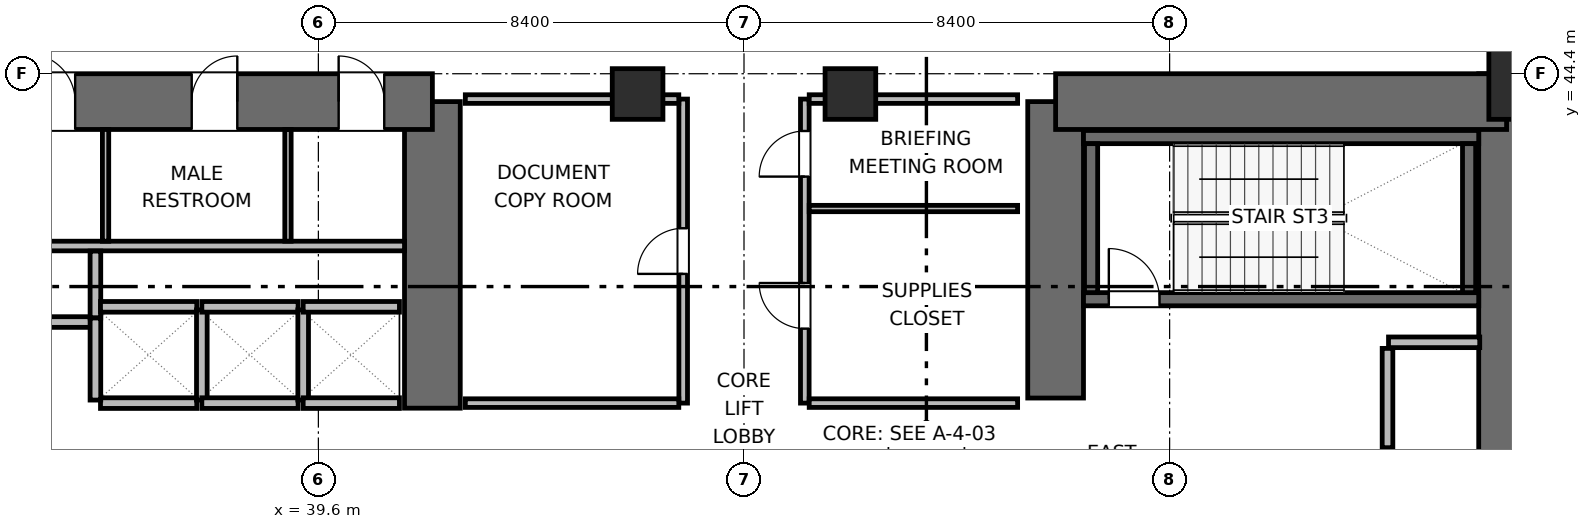
"""IFC4 building model, lengths in metres.
Left out: names, types, materials, properties, quantities, classifications, styles, units other than length and angle.
Written with IfcOpenShell. Run it as: python <this file> out.ifc"""

import sys

from ifc_helpers import new_model, si_unit, direction, frame, frame_2d, origin, origin_2d, place, context, subcontext, project, spatial, rectangle, extrude, element, fill, save


model = new_model("IFC4")
c1 = context("Model", 3, precision=1e-05, world=origin(), true_north=direction((0.0, 1.0)))
c2 = subcontext(c1, "Body", "Model", "MODEL_VIEW")
j1 = project(units=[si_unit("LENGTHUNIT", "METRE"), si_unit("PLANEANGLEUNIT", "RADIAN")], contexts=[c1])
p1 = place(None, origin())
s1 = spatial("IfcSite", under=j1, at=p1, CompositionType="ELEMENT")
p2 = place(p1, origin())
s2 = spatial("IfcBuilding", under=s1, at=p2, CompositionType="ELEMENT")
p3 = place(p2, frame((0.0, 0.0, 17.1)))
s3 = spatial("IfcBuildingStorey", under=s2, at=p3, CompositionType="ELEMENT", Elevation=17.1)
p4 = place(p3, frame((41.85, 37.8, 0.0), z_axis=(0.0, 0.0, 1.0), x_axis=(0.0, 1.0, 0.0)))
e1 = element("IfcWall", 1, at=p4, inside=s3, PredefinedType="SHEAR", context=c2, shape_type="SweptSolid", body=[
    extrude(rectangle(XDim=6.05, YDim=1.1, at=frame_2d((3.025, 0.0))), origin(), (0.0, 0.0, 1.0), 4.5),
])
p5 = place(p3, frame((32.95, 43.85, 0.0), z_axis=(0.0, 0.0, 1.0), x_axis=(1.0, 0.0, 0.0)))
e2 = element("IfcWall", 2, at=p5, inside=s3, PredefinedType="SHEAR", context=c2, shape_type="SweptSolid", body=[
    extrude(rectangle(XDim=8.9, YDim=1.1, at=frame_2d((4.45, 0.0))), origin(), (0.0, 0.0, 1.0), 4.5),
])
p6 = place(p5, frame((0.9, 0.0, 0.0)))
e3 = element("IfcOpeningElement", 3, at=p6, cuts=e2, PredefinedType="OPENING", context=c2, shape_type="SweptSolid", body=[
    extrude(rectangle(XDim=0.95, YDim=2.04, at=frame_2d((0.475, 1.02))), frame((0.0, 0.56, 0.0), z_axis=(0.0, -1.0, 0.0), x_axis=(1.0, 0.0, 0.0)), (0.0, 0.0, 1.0), 1.12),
])
p7 = place(p5, frame((4.15, 0.0, 0.0)))
e4 = element("IfcOpeningElement", 4, at=p7, cuts=e2, PredefinedType="OPENING", context=c2, shape_type="SweptSolid", body=[
    extrude(rectangle(XDim=0.9, YDim=2.02, at=frame_2d((0.45, 1.01))), frame((0.0, 0.56, 0.0), z_axis=(0.0, -1.0, 0.0), x_axis=(1.0, 0.0, 0.0)), (0.0, 0.0, 1.0), 1.12),
])
p8 = place(p5, frame((7.05, 0.0, 0.0)))
e5 = element("IfcOpeningElement", 5, at=p8, cuts=e2, PredefinedType="OPENING", context=c2, shape_type="SweptSolid", body=[
    extrude(rectangle(XDim=0.9, YDim=2.02, at=frame_2d((0.45, 1.01))), frame((0.0, 0.56, 0.0), z_axis=(0.0, -1.0, 0.0), x_axis=(1.0, 0.0, 0.0)), (0.0, 0.0, 1.0), 1.12),
])
p9 = place(p3, frame((54.15, 38.0, 0.0), z_axis=(0.0, 0.0, 1.0), x_axis=(0.0, 1.0, 0.0)))
e6 = element("IfcWall", 6, at=p9, inside=s3, PredefinedType="SHEAR", context=c2, shape_type="SweptSolid", body=[
    extrude(rectangle(XDim=5.85, YDim=1.1, at=frame_2d((2.925, 0.0))), origin(), (0.0, 0.0, 1.0), 4.5),
])
p10 = place(p3, frame((63.05, 27.6, 0.0), z_axis=(0.0, 0.0, 1.0), x_axis=(0.0, 1.0, 0.0)))
e7 = element("IfcWall", 7, at=p10, inside=s3, PredefinedType="SHEAR", context=c2, shape_type="SweptSolid", body=[
    extrude(rectangle(XDim=16.8, YDim=1.1, at=frame_2d((8.4, 0.0))), origin(), (0.0, 0.0, 1.0), 4.5),
])
p11 = place(p3, frame((54.15, 43.85, 0.0), z_axis=(0.0, 0.0, 1.0), x_axis=(1.0, 0.0, 0.0)))
e8 = element("IfcWall", 8, at=p11, inside=s3, PredefinedType="SHEAR", context=c2, shape_type="SweptSolid", body=[
    extrude(rectangle(XDim=8.9, YDim=1.1, at=frame_2d((4.45, 0.0))), origin(), (0.0, 0.0, 1.0), 4.5),
])
p12 = place(p3, frame((54.7, 39.95, 0.0), z_axis=(0.0, 0.0, 1.0), x_axis=(1.0, 0.0, 0.0)))
e9 = element("IfcWall", 9, at=p12, inside=s3, PredefinedType="SHEAR", context=c2, shape_type="SweptSolid", body=[
    extrude(rectangle(XDim=7.8, YDim=0.26, at=frame_2d((3.9, 0.0))), origin(), (0.0, 0.0, 1.0), 4.5),
])
p13 = place(p12, frame((0.5, 0.0, 0.0)))
e10 = element("IfcOpeningElement", 10, at=p13, cuts=e9, PredefinedType="OPENING", context=c2, shape_type="SweptSolid", body=[
    extrude(rectangle(XDim=1.0, YDim=2.04, at=frame_2d((0.5, 1.02))), frame((0.0, 0.14, 0.0), z_axis=(0.0, -1.0, 0.0), x_axis=(1.0, 0.0, 0.0)), (0.0, 0.0, 1.0), 0.28),
])
p14 = place(p3, frame((54.7, 43.15, 0.0), z_axis=(0.0, 0.0, 1.0), x_axis=(1.0, 0.0, 0.0)))
e11 = element("IfcWall", 11, at=p14, inside=s3, PredefinedType="SHEAR", context=c2, shape_type="SweptSolid", body=[
    extrude(rectangle(XDim=7.8, YDim=0.26, at=frame_2d((3.9, 0.0))), origin(), (0.0, 0.0, 1.0), 4.5),
])
for number, where, z_axis, x_axis in (
    (12, (54.85, 40.08, 0.0), (0.0, 0.0, 1.0), (0.0, 1.0, 0.0)),
    (13, (62.31, 40.08, 0.0), (0.0, 0.0, 1.0), (0.0, 1.0, 0.0)),
):
    element("IfcWall", number, at=place(p3, frame(where, z_axis=z_axis, x_axis=x_axis)), inside=s3, PredefinedType="SHEAR", context=c2, shape_type="SweptSolid", body=[
        extrude(rectangle(XDim=2.94, YDim=0.26, at=frame_2d((1.47, 0.0))), origin(), (0.0, 0.0, 1.0), 4.5),
    ])
p15 = place(p3, frame((63.6, 44.4, 0.0), z_axis=(0.0, 0.0, 1.0), x_axis=(1.0, 0.0, 0.0)))
e14 = element("IfcColumn", 14, at=p15, inside=s3, PredefinedType="COLUMN", context=c2, shape_type="SweptSolid", body=[
    extrude(rectangle(XDim=1.8, YDim=1.8, at=origin_2d()), origin(), (0.0, 0.0, 1.0), 4.5),
])
for number, where, z_axis, x_axis in (
    (15, (45.9, 44.0, 0.0), (0.0, 0.0, 1.0), (1.0, 0.0, 0.0)),
    (16, (50.1, 44.0, 0.0), (0.0, 0.0, 1.0), (1.0, 0.0, 0.0)),
):
    element("IfcColumn", number, at=place(p3, frame(where, z_axis=z_axis, x_axis=x_axis)), inside=s3, PredefinedType="COLUMN", context=c2, shape_type="SweptSolid", body=[
        extrude(rectangle(XDim=1.0, YDim=1.0, at=origin_2d()), origin(), (0.0, 0.0, 1.0), 4.5),
    ])
p16 = place(p3, frame((33.5, 41.0, 0.0), z_axis=(0.0, 0.0, 1.0), x_axis=(1.0, 0.0, 0.0)))
e17 = element("IfcWall", 17, at=p16, inside=s3, PredefinedType="PLUMBINGWALL", context=c2, shape_type="SweptSolid", body=[
    extrude(rectangle(XDim=7.8, YDim=0.19, at=frame_2d((3.9, 0.0))), origin(), (0.0, 0.0, 1.0), 4.24),
])
for number, where, z_axis, x_axis in (
    (18, (35.4, 41.095, 0.0), (0.0, 0.0, 1.0), (0.0, 1.0, 0.0)),
    (19, (39.0, 41.095, 0.0), (0.0, 0.0, 1.0), (0.0, 1.0, 0.0)),
):
    element("IfcWall", number, at=place(p3, frame(where, z_axis=z_axis, x_axis=x_axis)), inside=s3, PredefinedType="PARTITIONING", context=c2, shape_type="SweptSolid", body=[
        extrude(rectangle(XDim=2.205, YDim=0.125, at=frame_2d((1.103, 0.0))), origin(), (0.0, 0.0, 1.0), 4.24),
    ])
p17 = place(p3, frame((33.36, 39.5, 0.0), z_axis=(0.0, 0.0, 1.0), x_axis=(1.0, 0.0, 0.0)))
e20 = element("IfcWall", 20, at=p17, inside=s3, PredefinedType="PARTITIONING", context=c2, shape_type="SweptSolid", body=[
    extrude(rectangle(XDim=1.86, YDim=0.21, at=frame_2d((0.93, 0.0))), origin(), (0.0, 0.0, 1.0), 4.24),
])
p18 = place(p3, frame((35.2, 39.58, 0.0), z_axis=(0.0, 0.0, 1.0), x_axis=(0.0, 1.0, 0.0)))
e21 = element("IfcWall", 21, at=p18, inside=s3, PredefinedType="PARTITIONING", context=c2, shape_type="SweptSolid", body=[
    extrude(rectangle(XDim=1.32, YDim=0.21, at=frame_2d((0.66, 0.0))), origin(), (0.0, 0.0, 1.0), 4.24),
])
p19 = place(p3, frame((60.72, 39.1, 0.0), z_axis=(0.0, 0.0, 1.0), x_axis=(1.0, 0.0, 0.0)))
e22 = element("IfcWall", 22, at=p19, inside=s3, PredefinedType="PARTITIONING", context=c2, shape_type="SweptSolid", body=[
    extrude(rectangle(XDim=1.8, YDim=0.21, at=frame_2d((0.9, 0.0))), origin(), (0.0, 0.0, 1.0), 4.24),
])
p20 = place(p3, frame((60.7, 37.02, 0.0), z_axis=(0.0, 0.0, 1.0), x_axis=(0.0, 1.0, 0.0)))
e23 = element("IfcWall", 23, at=p20, inside=s3, PredefinedType="PARTITIONING", context=c2, shape_type="SweptSolid", body=[
    extrude(rectangle(XDim=1.96, YDim=0.21, at=frame_2d((0.98, 0.0))), origin(), (0.0, 0.0, 1.0), 4.24),
])
for number, where, z_axis, x_axis in (
    (24, (35.3, 37.9, 0.0), (0.0, 0.0, 1.0), (1.0, 0.0, 0.0)),
    (25, (35.3, 39.8, 0.0), (0.0, 0.0, 1.0), (1.0, 0.0, 0.0)),
):
    element("IfcWall", number, at=place(p3, frame(where, z_axis=z_axis, x_axis=x_axis)), inside=s3, PredefinedType="PARTITIONING", context=c2, shape_type="SweptSolid", body=[
        extrude(rectangle(XDim=1.9, YDim=0.21, at=frame_2d((0.95, 0.0))), origin(), (0.0, 0.0, 1.0), 4.24),
    ])
p21 = place(p3, frame((35.2, 37.96, 0.0), z_axis=(0.0, 0.0, 1.0), x_axis=(0.0, 1.0, 0.0)))
e26 = element("IfcWall", 26, at=p21, inside=s3, PredefinedType="PARTITIONING", context=c2, shape_type="SweptSolid", body=[
    extrude(rectangle(XDim=1.62, YDim=0.21, at=frame_2d((0.81, 0.0))), origin(), (0.0, 0.0, 1.0), 4.24),
])
p22 = place(p3, frame((37.3, 37.96, 0.0), z_axis=(0.0, 0.0, 1.0), x_axis=(0.0, 1.0, 0.0)))
e27 = element("IfcWall", 27, at=p22, inside=s3, PredefinedType="PARTITIONING", context=c2, shape_type="SweptSolid", body=[
    extrude(rectangle(XDim=1.78, YDim=0.21, at=frame_2d((0.89, 0.0))), origin(), (0.0, 0.0, 1.0), 4.24),
])
for number, where, z_axis, x_axis in (
    (28, (37.3, 37.9, 0.0), (0.0, 0.0, 1.0), (1.0, 0.0, 0.0)),
    (29, (37.3, 39.8, 0.0), (0.0, 0.0, 1.0), (1.0, 0.0, 0.0)),
):
    element("IfcWall", number, at=place(p3, frame(where, z_axis=z_axis, x_axis=x_axis)), inside=s3, PredefinedType="PARTITIONING", context=c2, shape_type="SweptSolid", body=[
        extrude(rectangle(XDim=1.9, YDim=0.21, at=frame_2d((0.95, 0.0))), origin(), (0.0, 0.0, 1.0), 4.24),
    ])
p23 = place(p3, frame((39.3, 37.96, 0.0), z_axis=(0.0, 0.0, 1.0), x_axis=(0.0, 1.0, 0.0)))
e30 = element("IfcWall", 30, at=p23, inside=s3, PredefinedType="PARTITIONING", context=c2, shape_type="SweptSolid", body=[
    extrude(rectangle(XDim=1.78, YDim=0.21, at=frame_2d((0.89, 0.0))), origin(), (0.0, 0.0, 1.0), 4.24),
])
for number, where, z_axis, x_axis in (
    (31, (39.3, 37.9, 0.0), (0.0, 0.0, 1.0), (1.0, 0.0, 0.0)),
    (32, (39.3, 39.8, 0.0), (0.0, 0.0, 1.0), (1.0, 0.0, 0.0)),
):
    element("IfcWall", number, at=place(p3, frame(where, z_axis=z_axis, x_axis=x_axis)), inside=s3, PredefinedType="PARTITIONING", context=c2, shape_type="SweptSolid", body=[
        extrude(rectangle(XDim=1.9, YDim=0.21, at=frame_2d((0.95, 0.0))), origin(), (0.0, 0.0, 1.0), 4.24),
    ])
p24 = place(p3, frame((46.8, 37.9, 0.0), z_axis=(0.0, 0.0, 1.0), x_axis=(0.0, 1.0, 0.0)))
e33 = element("IfcWall", 33, at=p24, inside=s3, PredefinedType="PARTITIONING", context=c2, shape_type="SweptSolid", body=[
    extrude(rectangle(XDim=6.0, YDim=0.17, at=frame_2d((3.0, 0.0))), origin(), (0.0, 0.0, 1.0), 4.24),
])
p25 = place(p24, frame((2.55, 0.0, 0.0)))
e34 = element("IfcOpeningElement", 34, at=p25, cuts=e33, PredefinedType="OPENING", context=c2, shape_type="SweptSolid", body=[
    extrude(rectangle(XDim=0.9, YDim=2.02, at=frame_2d((0.45, 1.01))), frame((0.0, 0.095, 0.0), z_axis=(0.0, -1.0, 0.0), x_axis=(1.0, 0.0, 0.0)), (0.0, 0.0, 1.0), 0.19),
])
p26 = place(p3, frame((42.5, 37.9, 0.0), z_axis=(0.0, 0.0, 1.0), x_axis=(1.0, 0.0, 0.0)))
e35 = element("IfcWall", 35, at=p26, inside=s3, PredefinedType="PARTITIONING", context=c2, shape_type="SweptSolid", body=[
    extrude(rectangle(XDim=4.213, YDim=0.17, at=frame_2d((2.106, 0.0))), origin(), (0.0, 0.0, 1.0), 4.24),
])
p27 = place(p3, frame((42.5, 43.9, 0.0), z_axis=(0.0, 0.0, 1.0), x_axis=(1.0, 0.0, 0.0)))
e36 = element("IfcWall", 36, at=p27, inside=s3, PredefinedType="PARTITIONING", context=c2, shape_type="SweptSolid", body=[
    extrude(rectangle(XDim=4.213, YDim=0.17, at=frame_2d((2.106, 0.0))), origin(), (0.0, 0.0, 1.0), 3.125),
])
p28 = place(p3, frame((49.2, 37.9, 0.0), z_axis=(0.0, 0.0, 1.0), x_axis=(0.0, 1.0, 0.0)))
e37 = element("IfcWall", 37, at=p28, inside=s3, PredefinedType="PARTITIONING", context=c2, shape_type="SweptSolid", body=[
    extrude(rectangle(XDim=6.0, YDim=0.17, at=frame_2d((3.0, 0.0))), origin(), (0.0, 0.0, 1.0), 4.24),
])
p29 = place(p28, frame((1.47, 0.0, 0.0)))
e38 = element("IfcOpeningElement", 38, at=p29, cuts=e37, PredefinedType="OPENING", context=c2, shape_type="SweptSolid", body=[
    extrude(rectangle(XDim=0.9, YDim=2.02, at=frame_2d((0.45, 1.01))), frame((0.0, 0.095, 0.0), z_axis=(0.0, -1.0, 0.0), x_axis=(1.0, 0.0, 0.0)), (0.0, 0.0, 1.0), 0.19),
])
p30 = place(p28, frame((4.47, 0.0, 0.0)))
e39 = element("IfcOpeningElement", 39, at=p30, cuts=e37, PredefinedType="OPENING", context=c2, shape_type="SweptSolid", body=[
    extrude(rectangle(XDim=0.9, YDim=2.02, at=frame_2d((0.45, 1.01))), frame((0.0, 0.095, 0.0), z_axis=(0.0, -1.0, 0.0), x_axis=(1.0, 0.0, 0.0)), (0.0, 0.0, 1.0), 0.19),
])
p31 = place(p3, frame((49.287, 37.9, 0.0), z_axis=(0.0, 0.0, 1.0), x_axis=(1.0, 0.0, 0.0)))
e40 = element("IfcWall", 40, at=p31, inside=s3, PredefinedType="PARTITIONING", context=c2, shape_type="SweptSolid", body=[
    extrude(rectangle(XDim=4.113, YDim=0.17, at=frame_2d((2.056, 0.0))), origin(), (0.0, 0.0, 1.0), 4.24),
])
p32 = place(p3, frame((49.287, 43.9, 0.0), z_axis=(0.0, 0.0, 1.0), x_axis=(1.0, 0.0, 0.0)))
e41 = element("IfcWall", 41, at=p32, inside=s3, PredefinedType="PARTITIONING", context=c2, shape_type="SweptSolid", body=[
    extrude(rectangle(XDim=4.113, YDim=0.17, at=frame_2d((2.056, 0.0))), origin(), (0.0, 0.0, 1.0), 3.125),
])
p33 = place(p3, frame((49.287, 41.74, 0.0), z_axis=(0.0, 0.0, 1.0), x_axis=(1.0, 0.0, 0.0)))
e42 = element("IfcWall", 42, at=p33, inside=s3, PredefinedType="PARTITIONING", context=c2, shape_type="SweptSolid", body=[
    extrude(rectangle(XDim=4.113, YDim=0.125, at=frame_2d((2.056, 0.0))), origin(), (0.0, 0.0, 1.0), 4.24),
])
p34 = place(p13, origin())
e43 = element("IfcDoor", 43, at=p34, inside=s3, OperationType="SINGLE_SWING_LEFT", PredefinedType="DOOR", context=c2, shape_type="SweptSolid", body=[
    extrude(rectangle(XDim=1.0, YDim=2.04, at=frame_2d((0.5, 1.02))), frame((0.0, 0.025, 0.0), z_axis=(0.0, -1.0, 0.0), x_axis=(1.0, 0.0, 0.0)), (0.0, 0.0, 1.0), 0.05),
])
fill(e10, e43)
p35 = place(p6, origin())
e44 = element("IfcDoor", 44, at=p35, inside=s3, OperationType="SINGLE_SWING_LEFT", PredefinedType="DOOR", context=c2, shape_type="SweptSolid", body=[
    extrude(rectangle(XDim=0.95, YDim=2.04, at=frame_2d((0.475, 1.02))), frame((0.0, 0.025, 0.0), z_axis=(0.0, -1.0, 0.0), x_axis=(1.0, 0.0, 0.0)), (0.0, 0.0, 1.0), 0.05),
])
fill(e3, e44)
p36 = place(p7, origin())
e45 = element("IfcDoor", 45, at=p36, inside=s3, OperationType="SINGLE_SWING_RIGHT", PredefinedType="DOOR", context=c2, shape_type="SweptSolid", body=[
    extrude(rectangle(XDim=0.9, YDim=2.02, at=frame_2d((0.45, 1.01))), frame((0.0, 0.025, 0.0), z_axis=(0.0, -1.0, 0.0), x_axis=(1.0, 0.0, 0.0)), (0.0, 0.0, 1.0), 0.05),
])
fill(e4, e45)
p37 = place(p8, origin())
e46 = element("IfcDoor", 46, at=p37, inside=s3, OperationType="SINGLE_SWING_LEFT", PredefinedType="DOOR", context=c2, shape_type="SweptSolid", body=[
    extrude(rectangle(XDim=0.9, YDim=2.02, at=frame_2d((0.45, 1.01))), frame((0.0, 0.025, 0.0), z_axis=(0.0, -1.0, 0.0), x_axis=(1.0, 0.0, 0.0)), (0.0, 0.0, 1.0), 0.05),
])
fill(e5, e46)
p38 = place(p25, origin())
e47 = element("IfcDoor", 47, at=p38, inside=s3, OperationType="SINGLE_SWING_LEFT", PredefinedType="DOOR", context=c2, shape_type="SweptSolid", body=[
    extrude(rectangle(XDim=0.9, YDim=2.02, at=frame_2d((0.45, 1.01))), frame((0.0, 0.025, 0.0), z_axis=(0.0, -1.0, 0.0), x_axis=(1.0, 0.0, 0.0)), (0.0, 0.0, 1.0), 0.05),
])
fill(e34, e47)
p39 = place(p29, origin())
e48 = element("IfcDoor", 48, at=p39, inside=s3, OperationType="SINGLE_SWING_RIGHT", PredefinedType="DOOR", context=c2, shape_type="SweptSolid", body=[
    extrude(rectangle(XDim=0.9, YDim=2.02, at=frame_2d((0.45, 1.01))), frame((0.0, 0.025, 0.0), z_axis=(0.0, -1.0, 0.0), x_axis=(1.0, 0.0, 0.0)), (0.0, 0.0, 1.0), 0.05),
])
fill(e38, e48)
p40 = place(p30, origin())
e49 = element("IfcDoor", 49, at=p40, inside=s3, OperationType="SINGLE_SWING_LEFT", PredefinedType="DOOR", context=c2, shape_type="SweptSolid", body=[
    extrude(rectangle(XDim=0.9, YDim=2.02, at=frame_2d((0.45, 1.01))), frame((0.0, 0.025, 0.0), z_axis=(0.0, -1.0, 0.0), x_axis=(1.0, 0.0, 0.0)), (0.0, 0.0, 1.0), 0.05),
])
fill(e39, e49)
save(model, sys.argv[1])
